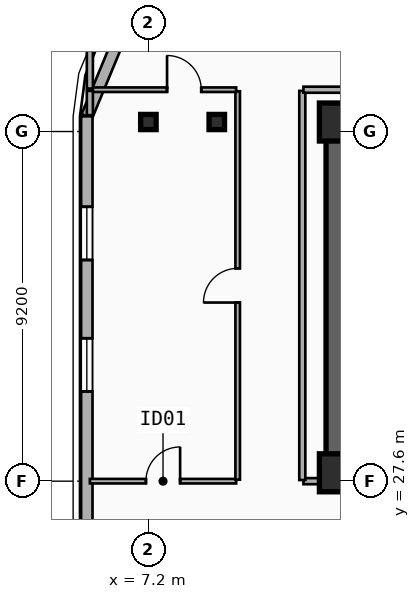
"""IFC4 building model, lengths in metres.
Left out: names, types, materials, properties, quantities, classifications, styles, units other than length and angle.
Written with IfcOpenShell. Run it as: python <this file> out.ifc"""

import sys

from ifc_helpers import new_model, si_unit, direction, frame, frame_2d, origin, origin_2d, place, context, subcontext, project, spatial, rectangle, i_section, extrude, element, fill, save


model = new_model("IFC4")
c1 = context("Model", 3, precision=1e-05, world=origin(), true_north=direction((0.0, 1.0)))
c2 = subcontext(c1, "Body", "Model", "MODEL_VIEW")
j1 = project(units=[si_unit("LENGTHUNIT", "METRE"), si_unit("PLANEANGLEUNIT", "RADIAN")], contexts=[c1])
p1 = place(None, origin())
s1 = spatial("IfcSite", under=j1, at=p1, CompositionType="ELEMENT")
p2 = place(p1, origin())
s2 = spatial("IfcBuilding", under=s1, at=p2, CompositionType="ELEMENT")
p3 = place(p2, frame((0.0, 0.0, 193.2)))
s3 = spatial("IfcBuildingStorey", under=s2, at=p3, CompositionType="ELEMENT", Elevation=193.2)
p4 = place(p3, frame((12.15, 37.05, 0.0), z_axis=(0.0, 0.0, 1.0), x_axis=(1.0, 0.0, 0.0)))
e1 = element("IfcWall", 1, at=p4, inside=s3, PredefinedType="SHEAR", context=c2, shape_type="SweptSolid", body=[
    extrude(rectangle(XDim=33.23, YDim=0.55, at=frame_2d((16.615, 0.0))), origin(), (0.0, 0.0, 1.0), 3.6),
])
p5 = place(p3, frame((21.18, 27.82, 0.0), z_axis=(0.0, 0.0, 1.0), x_axis=(-1.0, 0.0, 0.0)))
e2 = element("IfcWall", 2, at=p5, inside=s3, PredefinedType="SHEAR", context=c2, shape_type="SweptSolid", body=[
    extrude(rectangle(XDim=9.03, YDim=0.55, at=frame_2d((4.515, 0.0))), origin(), (0.0, 0.0, 1.0), 3.6),
])
p6 = place(p5, frame((2.68, 0.0, 0.0)))
e3 = element("IfcOpeningElement", 3, at=p6, cuts=e2, PredefinedType="OPENING", context=c2, shape_type="SweptSolid", body=[
    extrude(rectangle(XDim=1.1, YDim=2.15, at=frame_2d((0.55, 1.075))), frame((0.0, 0.285, 0.0), z_axis=(0.0, -1.0, 0.0), x_axis=(1.0, 0.0, 0.0)), (0.0, 0.0, 1.0), 0.57),
])
p7 = place(p3, frame((12.15, 28.095, 0.0), z_axis=(0.0, 0.0, 1.0), x_axis=(0.0, 1.0, 0.0)))
e4 = element("IfcWall", 4, at=p7, inside=s3, PredefinedType="SHEAR", context=c2, shape_type="SweptSolid", body=[
    extrude(rectangle(XDim=8.68, YDim=0.55, at=frame_2d((4.34, 0.0))), origin(), (0.0, 0.0, 1.0), 3.6),
])
for number, where, z_axis, x_axis in (
    (5, (12.2, 27.82, 0.0), (0.0, 0.0, 1.0), (1.0, 0.0, 0.0)),
    (6, (12.2, 37.05, 0.0), (0.0, 0.0, 1.0), (1.0, 0.0, 0.0)),
):
    element("IfcColumn", number, at=place(p3, frame(where, z_axis=z_axis, x_axis=x_axis)), inside=s3, PredefinedType="COLUMN", context=c2, shape_type="SweptSolid", body=[
        extrude(rectangle(XDim=1.0, YDim=1.0, at=origin_2d()), origin(), (0.0, 0.0, 1.0), 3.6),
    ])
for number, where, z_axis, x_axis in (
    (7, (9.0, 37.05, 0.0), (0.0, 0.0, 1.0), (1.0, 0.0, 0.0)),
    (8, (7.2, 37.05, 0.0), (0.0, 0.0, 1.0), (1.0, 0.0, 0.0)),
):
    element("IfcColumn", number, at=place(p3, frame(where, z_axis=z_axis, x_axis=x_axis)), inside=s3, PredefinedType="COLUMN", context=c2, shape_type="SweptSolid", body=[
        extrude(i_section(OverallWidth=0.408, OverallDepth=0.4, WebThickness=0.025, FlangeThickness=0.039, FilletRadius=0.015, at=origin_2d()), origin(), (0.0, 0.0, 1.0), 3.6),
    ])
p8 = place(p3, frame((5.58, 37.2, 0.0), z_axis=(0.0, 0.0, 1.0), x_axis=(0.382636798336, 0.92389884758, 0.0)))
e9 = element("IfcWall", 9, at=p8, inside=s3, PredefinedType="SOLIDWALL", context=c2, shape_type="SweptSolid", body=[
    extrude(rectangle(XDim=3.077, YDim=0.3, at=frame_2d((1.538, 0.0))), origin(), (0.0, 0.0, 1.0), 3.34),
])
p9 = place(p3, frame((5.58, 8.6, 0.0), z_axis=(0.0, 0.0, 1.0), x_axis=(0.0, 1.0, 0.0)))
e10 = element("IfcWall", 10, at=p9, inside=s3, PredefinedType="SOLIDWALL", context=c2, shape_type="SweptSolid", body=[
    extrude(rectangle(XDim=28.6, YDim=0.3, at=frame_2d((14.3, 0.0))), origin(), (0.0, 0.0, 1.0), 3.34),
])
p10 = place(p9, frame((21.36, 0.0, 0.34)))
e11 = element("IfcOpeningElement", 11, at=p10, cuts=e10, PredefinedType="OPENING", context=c2, shape_type="SweptSolid", body=[
    extrude(rectangle(XDim=1.4, YDim=2.1, at=frame_2d((0.7, 1.05))), frame((0.0, 0.16, 0.0), z_axis=(0.0, -1.0, 0.0), x_axis=(1.0, 0.0, 0.0)), (0.0, 0.0, 1.0), 0.32),
])
p11 = place(p9, frame((24.82, 0.0, 0.34)))
e12 = element("IfcOpeningElement", 12, at=p11, cuts=e10, PredefinedType="OPENING", context=c2, shape_type="SweptSolid", body=[
    extrude(rectangle(XDim=1.4, YDim=2.1, at=frame_2d((0.7, 1.05))), frame((0.0, 0.16, 0.0), z_axis=(0.0, -1.0, 0.0), x_axis=(1.0, 0.0, 0.0)), (0.0, 0.0, 1.0), 0.32),
])
p12 = place(p9, frame((4.797, 0.0, 0.34)))
e13 = element("IfcOpeningElement", 13, at=p12, cuts=e10, PredefinedType="OPENING", context=c2, shape_type="SweptSolid", body=[
    extrude(rectangle(XDim=1.4, YDim=2.1, at=frame_2d((0.7, 1.05))), frame((0.0, 0.16, 0.0), z_axis=(0.0, -1.0, 0.0), x_axis=(1.0, 0.0, 0.0)), (0.0, 0.0, 1.0), 0.32),
])
p13 = place(p9, frame((10.673, 0.0, 0.34)))
e14 = element("IfcOpeningElement", 14, at=p13, cuts=e10, PredefinedType="OPENING", context=c2, shape_type="SweptSolid", body=[
    extrude(rectangle(XDim=1.4, YDim=2.1, at=frame_2d((0.7, 1.05))), frame((0.0, 0.16, 0.0), z_axis=(0.0, -1.0, 0.0), x_axis=(1.0, 0.0, 0.0)), (0.0, 0.0, 1.0), 0.32),
])
p14 = place(p3, frame((5.66, 27.6, 0.0), z_axis=(0.0, 0.0, 1.0), x_axis=(1.0, 0.0, 0.0)))
e15 = element("IfcWall", 15, at=p14, inside=s3, PredefinedType="PARTITIONING", context=c2, shape_type="SweptSolid", body=[
    extrude(rectangle(XDim=3.85, YDim=0.12, at=frame_2d((1.925, 0.0))), origin(), (0.0, 0.0, 1.0), 2.67),
])
p15 = place(p14, frame((1.475, 0.0, 0.0)))
e16 = element("IfcOpeningElement", 16, at=p15, cuts=e15, PredefinedType="OPENING", context=c2, shape_type="SweptSolid", body=[
    extrude(rectangle(XDim=0.9, YDim=2.1, at=frame_2d((0.45, 1.05))), frame((0.0, 0.07, 0.0), z_axis=(0.0, -1.0, 0.0), x_axis=(1.0, 0.0, 0.0)), (0.0, 0.0, 1.0), 0.14),
])
p16 = place(p3, frame((9.55, 27.64, 0.0), z_axis=(0.0, 0.0, 1.0), x_axis=(0.0, 1.0, 0.0)))
e17 = element("IfcWall", 17, at=p16, inside=s3, PredefinedType="PARTITIONING", context=c2, shape_type="SweptSolid", body=[
    extrude(rectangle(XDim=10.22, YDim=0.12, at=frame_2d((5.11, 0.0))), origin(), (0.0, 0.0, 1.0), 2.82),
])
p17 = place(p16, frame((4.66, 0.0, 0.0)))
e18 = element("IfcOpeningElement", 18, at=p17, cuts=e17, PredefinedType="OPENING", context=c2, shape_type="SweptSolid", body=[
    extrude(rectangle(XDim=0.9, YDim=2.1, at=frame_2d((0.45, 1.05))), frame((0.0, 0.07, 0.0), z_axis=(0.0, -1.0, 0.0), x_axis=(1.0, 0.0, 0.0)), (0.0, 0.0, 1.0), 0.14),
])
p18 = place(p3, frame((5.66, 37.9, 0.0), z_axis=(0.0, 0.0, 1.0), x_axis=(1.0, 0.0, 0.0)))
e19 = element("IfcWall", 19, at=p18, inside=s3, PredefinedType="PARTITIONING", context=c2, shape_type="SweptSolid", body=[
    extrude(rectangle(XDim=3.85, YDim=0.12, at=frame_2d((1.925, 0.0))), origin(), (0.0, 0.0, 1.0), 3.34),
])
p19 = place(p18, frame((2.031, 0.0, 0.0)))
e20 = element("IfcOpeningElement", 20, at=p19, cuts=e19, PredefinedType="OPENING", context=c2, shape_type="SweptSolid", body=[
    extrude(rectangle(XDim=0.9, YDim=2.1, at=frame_2d((0.45, 1.05))), frame((0.0, 0.07, 0.0), z_axis=(0.0, -1.0, 0.0), x_axis=(1.0, 0.0, 0.0)), (0.0, 0.0, 1.0), 0.14),
])
p20 = place(p3, frame((11.28, 27.6, 0.0), z_axis=(0.0, 0.0, 1.0), x_axis=(1.0, 0.0, 0.0)))
e21 = element("IfcWall", 21, at=p20, inside=s3, PredefinedType="PARTITIONING", context=c2, shape_type="SweptSolid", body=[
    extrude(rectangle(XDim=0.84, YDim=0.16, at=frame_2d((0.42, 0.0))), origin(), (0.0, 0.0, 1.0), 2.41),
])
p21 = place(p3, frame((11.25, 27.63, 0.0), z_axis=(0.0, 0.0, 1.0), x_axis=(0.0, 1.0, 0.0)))
e22 = element("IfcWall", 22, at=p21, inside=s3, PredefinedType="PARTITIONING", context=c2, shape_type="SweptSolid", body=[
    extrude(rectangle(XDim=10.24, YDim=0.16, at=frame_2d((5.12, 0.0))), origin(), (0.0, 0.0, 1.0), 2.82),
])
p22 = place(p3, frame((11.28, 37.9, 0.0), z_axis=(0.0, 0.0, 1.0), x_axis=(1.0, 0.0, 0.0)))
e23 = element("IfcWall", 23, at=p22, inside=s3, PredefinedType="PARTITIONING", context=c2, shape_type="SweptSolid", body=[
    extrude(rectangle(XDim=35.04, YDim=0.16, at=frame_2d((17.52, 0.0))), origin(), (0.0, 0.0, 1.0), 3.34),
])
p23 = place(p3, frame((5.66, 37.93, 0.0), z_axis=(0.0, 0.0, 1.0), x_axis=(0.0, 1.0, 0.0)))
e24 = element("IfcWall", 24, at=p23, inside=s3, PredefinedType="PARTITIONING", context=c2, shape_type="SweptSolid", body=[
    extrude(rectangle(XDim=1.44, YDim=0.16, at=frame_2d((0.72, 0.0))), origin(), (0.0, 0.0, 1.0), 3.34),
])
p24 = place(p3, frame((5.66, 37.23, 0.0), z_axis=(0.0, 0.0, 1.0), x_axis=(0.0, 1.0, 0.0)))
e25 = element("IfcWall", 25, at=p24, inside=s3, PredefinedType="PARTITIONING", context=c2, shape_type="SweptSolid", body=[
    extrude(rectangle(XDim=0.64, YDim=0.16, at=frame_2d((0.32, 0.0))), origin(), (0.0, 0.0, 1.0), 3.34),
])
p25 = place(p10, origin())
e26 = element("IfcWindow", 26, at=p25, inside=s3, PartitioningType="SINGLE_PANEL", PredefinedType="WINDOW", context=c2, shape_type="SweptSolid", body=[
    extrude(rectangle(XDim=1.4, YDim=2.1, at=frame_2d((0.7, 1.05))), frame((0.0, 0.03, 0.0), z_axis=(0.0, -1.0, 0.0), x_axis=(1.0, 0.0, 0.0)), (0.0, 0.0, 1.0), 0.06),
])
fill(e11, e26)
p26 = place(p11, origin())
e27 = element("IfcWindow", 27, at=p26, inside=s3, PartitioningType="SINGLE_PANEL", PredefinedType="WINDOW", context=c2, shape_type="SweptSolid", body=[
    extrude(rectangle(XDim=1.4, YDim=2.1, at=frame_2d((0.7, 1.05))), frame((0.0, 0.03, 0.0), z_axis=(0.0, -1.0, 0.0), x_axis=(1.0, 0.0, 0.0)), (0.0, 0.0, 1.0), 0.06),
])
fill(e12, e27)
p27 = place(p15, origin())
e28 = element("IfcDoor", 28, at=p27, inside=s3, OperationType="SINGLE_SWING_RIGHT", PredefinedType="DOOR", context=c2, shape_type="SweptSolid", body=[
    extrude(rectangle(XDim=0.9, YDim=2.1, at=frame_2d((0.45, 1.05))), frame((0.0, 0.025, 0.0), z_axis=(0.0, -1.0, 0.0), x_axis=(1.0, 0.0, 0.0)), (0.0, 0.0, 1.0), 0.05),
])
fill(e16, e28)
p28 = place(p17, origin())
e29 = element("IfcDoor", 29, at=p28, inside=s3, OperationType="SINGLE_SWING_LEFT", PredefinedType="DOOR", context=c2, shape_type="SweptSolid", body=[
    extrude(rectangle(XDim=0.9, YDim=2.1, at=frame_2d((0.45, 1.05))), frame((0.0, 0.025, 0.0), z_axis=(0.0, -1.0, 0.0), x_axis=(1.0, 0.0, 0.0)), (0.0, 0.0, 1.0), 0.05),
])
fill(e18, e29)
p29 = place(p19, origin())
e30 = element("IfcDoor", 30, at=p29, inside=s3, OperationType="SINGLE_SWING_LEFT", PredefinedType="DOOR", context=c2, shape_type="SweptSolid", body=[
    extrude(rectangle(XDim=0.9, YDim=2.1, at=frame_2d((0.45, 1.05))), frame((0.0, 0.025, 0.0), z_axis=(0.0, -1.0, 0.0), x_axis=(1.0, 0.0, 0.0)), (0.0, 0.0, 1.0), 0.05),
])
fill(e20, e30)
save(model, sys.argv[1])
